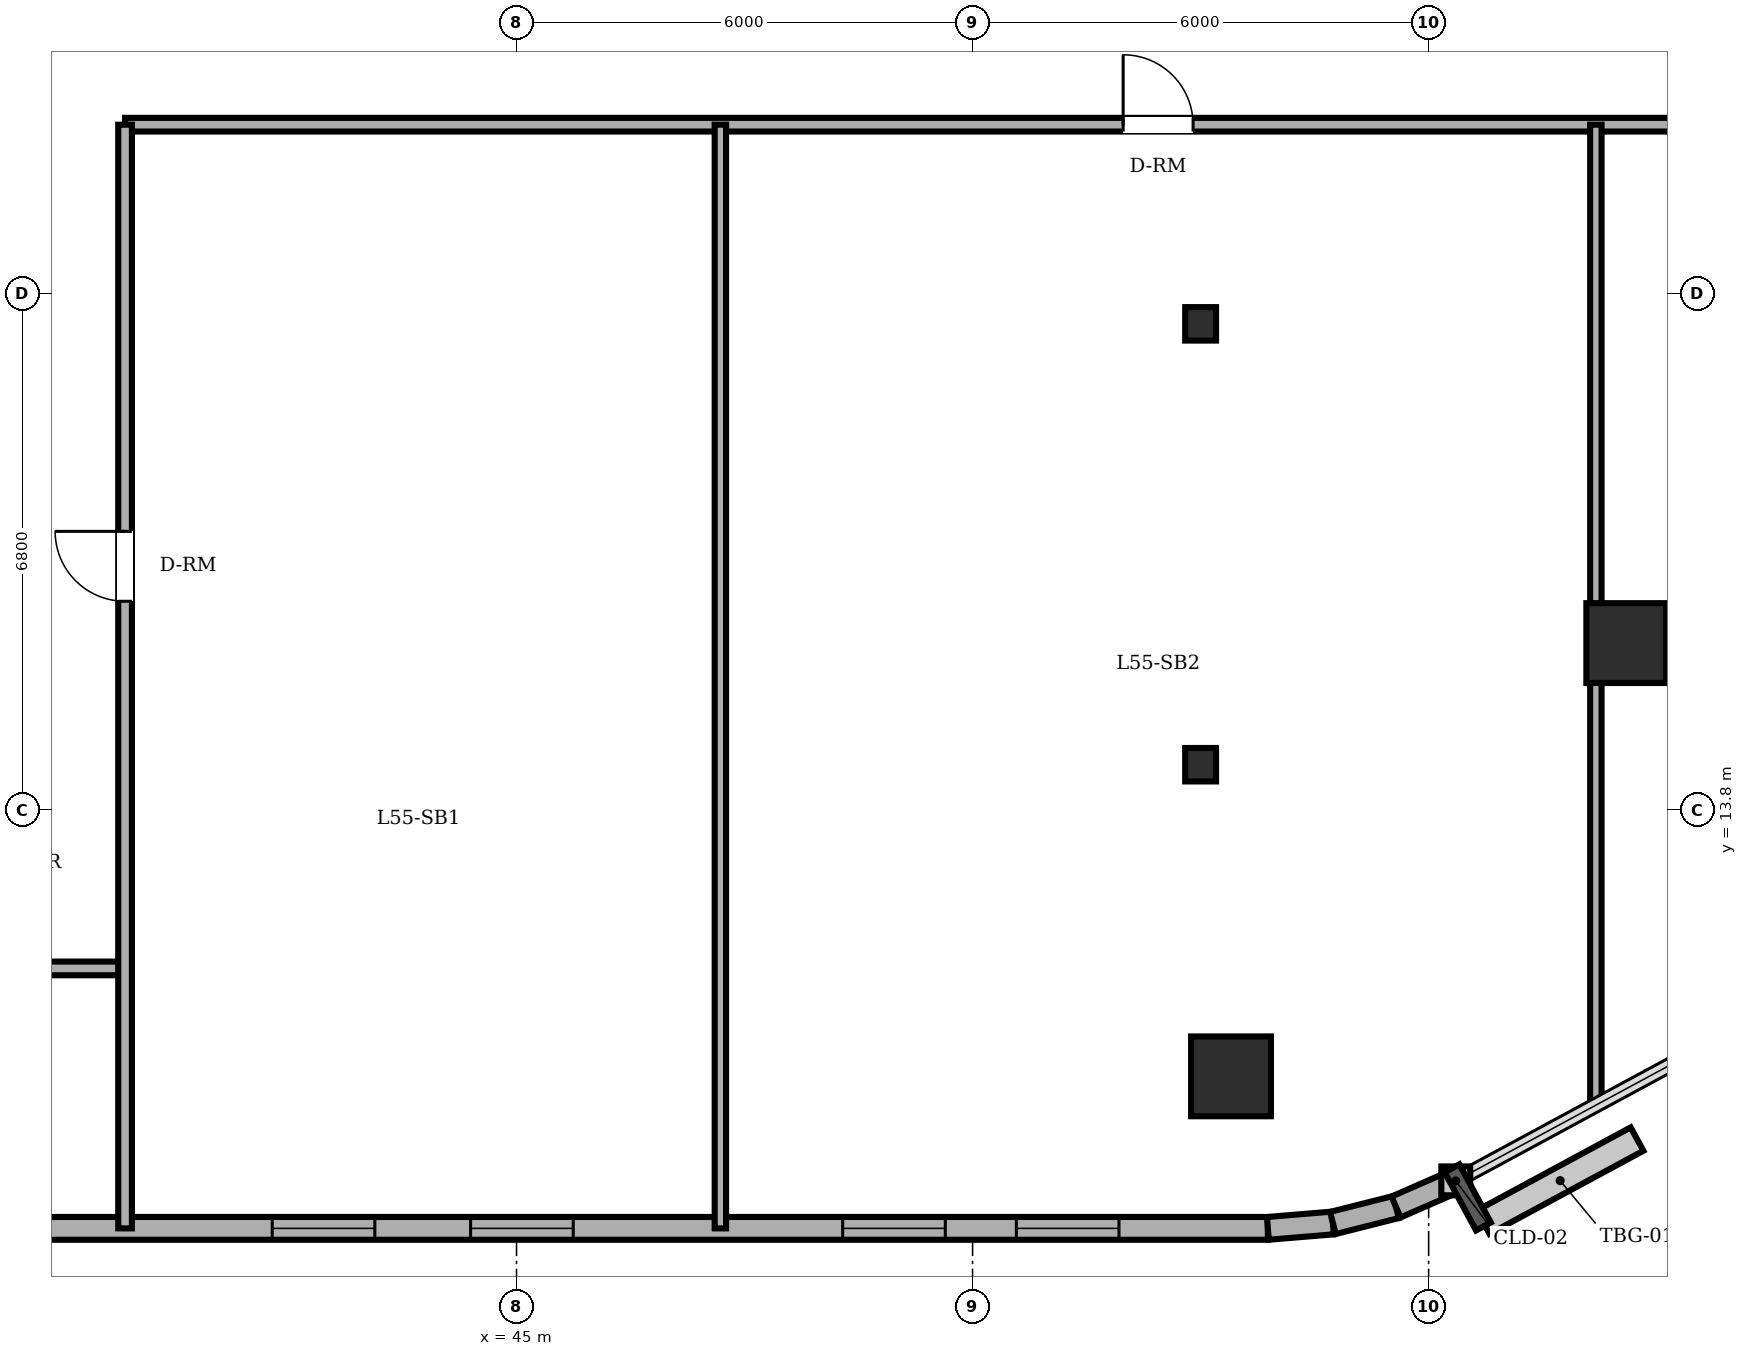
"""IFC4 building model, lengths in metres.
Left out: names, types, materials, properties, quantities, classifications, styles, units other than length and angle.
Written with IfcOpenShell. Run it as: python <this file> out.ifc"""

import sys

from ifc_helpers import new_model, si_unit, direction, frame, frame_2d, origin, origin_2d, place, context, subcontext, project, spatial, rectangle, circle, i_section, extrude, element, fill, save


model = new_model("IFC4")
c1 = context("Model", 3, precision=1e-05, world=origin(), true_north=direction((0.0, 1.0)))
c2 = subcontext(c1, "Body", "Model", "MODEL_VIEW")
j1 = project(units=[si_unit("LENGTHUNIT", "METRE"), si_unit("PLANEANGLEUNIT", "RADIAN")], contexts=[c1])
p1 = place(None, origin())
s1 = spatial("IfcSite", under=j1, at=p1, CompositionType="ELEMENT")
p2 = place(p1, origin())
s2 = spatial("IfcBuilding", under=s1, at=p2, CompositionType="ELEMENT")
p3 = place(p2, frame((0.0, 0.0, 212.1)))
s3 = spatial("IfcBuildingStorey", under=s2, at=p3, CompositionType="ELEMENT", Elevation=212.1)
for number, where, z_axis, x_axis in (
    (1, (54.4, 10.3, 0.0), (0.0, 0.0, 1.0), (1.0, 0.0, 0.0)),
    (2, (59.6, 16.0, 0.0), (0.0, 0.0, 1.0), (1.0, 0.0, 0.0)),
):
    element("IfcColumn", number, at=place(p3, frame(where, z_axis=z_axis, x_axis=x_axis)), inside=s3, PredefinedType="COLUMN", context=c2, shape_type="SweptSolid", body=[
        extrude(circle(Radius=0.525, at=origin_2d()), origin(), (0.0, 0.0, 1.0), 3.6),
    ])
for number, where, z_axis, x_axis in (
    (3, (54.0, 14.4, 0.0), (0.0, 0.0, 1.0), (1.0, 0.0, 0.0)),
    (4, (54.0, 20.2, 0.0), (0.0, 0.0, 1.0), (1.0, 0.0, 0.0)),
):
    element("IfcColumn", number, at=place(p3, frame(where, z_axis=z_axis, x_axis=x_axis)), inside=s3, PredefinedType="COLUMN", context=c2, shape_type="SweptSolid", body=[
        extrude(i_section(OverallWidth=0.406, OverallDepth=0.44, WebThickness=0.024, FlangeThickness=0.039, FilletRadius=0.015, at=origin_2d()), origin(), (0.0, 0.0, 1.0), 3.6),
    ])
p4 = place(p3, frame((22.4, 8.3, 0.0), z_axis=(0.0, 0.0, 1.0), x_axis=(1.0, 0.0, 0.0)))
e5 = element("IfcWall", 5, at=p4, inside=s3, PredefinedType="SOLIDWALL", context=c2, shape_type="SweptSolid", body=[
    extrude(rectangle(XDim=32.485, YDim=0.3, at=frame_2d((16.243, 0.0))), origin(), (0.0, 0.0, 1.0), 3.4),
])
p5 = place(p4, frame((4.525, 0.0, 0.0)))
e6 = element("IfcOpeningElement", 6, at=p5, cuts=e5, PredefinedType="OPENING", context=c2, shape_type="SweptSolid", body=[
    extrude(rectangle(XDim=0.95, YDim=2.2, at=frame_2d((0.475, 1.1))), frame((0.0, 0.16, 0.0), z_axis=(0.0, -1.0, 0.0), x_axis=(1.0, 0.0, 0.0)), (0.0, 0.0, 1.0), 0.32),
])
p6 = place(p4, frame((1.3, 0.0, 0.85)))
e7 = element("IfcOpeningElement", 7, at=p6, cuts=e5, PredefinedType="OPENING", context=c2, shape_type="SweptSolid", body=[
    extrude(rectangle(XDim=1.35, YDim=1.55, at=frame_2d((0.675, 0.775))), frame((0.0, 0.16, 0.0), z_axis=(0.0, -1.0, 0.0), x_axis=(1.0, 0.0, 0.0)), (0.0, 0.0, 1.0), 0.32),
])
p7 = place(p4, frame((10.075, 0.0, 0.85)))
e8 = element("IfcOpeningElement", 8, at=p7, cuts=e5, PredefinedType="OPENING", context=c2, shape_type="SweptSolid", body=[
    extrude(rectangle(XDim=1.35, YDim=1.55, at=frame_2d((0.675, 0.775))), frame((0.0, 0.16, 0.0), z_axis=(0.0, -1.0, 0.0), x_axis=(1.0, 0.0, 0.0)), (0.0, 0.0, 1.0), 0.32),
])
p8 = place(p4, frame((13.425, 0.0, 0.85)))
e9 = element("IfcOpeningElement", 9, at=p8, cuts=e5, PredefinedType="OPENING", context=c2, shape_type="SweptSolid", body=[
    extrude(rectangle(XDim=1.35, YDim=1.55, at=frame_2d((0.675, 0.775))), frame((0.0, 0.16, 0.0), z_axis=(0.0, -1.0, 0.0), x_axis=(1.0, 0.0, 0.0)), (0.0, 0.0, 1.0), 0.32),
])
p9 = place(p4, frame((19.386, 0.0, 0.85)))
e10 = element("IfcOpeningElement", 10, at=p9, cuts=e5, PredefinedType="OPENING", context=c2, shape_type="SweptSolid", body=[
    extrude(rectangle(XDim=1.35, YDim=1.55, at=frame_2d((0.675, 0.775))), frame((0.0, 0.16, 0.0), z_axis=(0.0, -1.0, 0.0), x_axis=(1.0, 0.0, 0.0)), (0.0, 0.0, 1.0), 0.32),
])
p10 = place(p4, frame((21.996, 0.0, 0.85)))
e11 = element("IfcOpeningElement", 11, at=p10, cuts=e5, PredefinedType="OPENING", context=c2, shape_type="SweptSolid", body=[
    extrude(rectangle(XDim=1.35, YDim=1.55, at=frame_2d((0.675, 0.775))), frame((0.0, 0.16, 0.0), z_axis=(0.0, -1.0, 0.0), x_axis=(1.0, 0.0, 0.0)), (0.0, 0.0, 1.0), 0.32),
])
p11 = place(p4, frame((26.891, 0.0, 0.85)))
e12 = element("IfcOpeningElement", 12, at=p11, cuts=e5, PredefinedType="OPENING", context=c2, shape_type="SweptSolid", body=[
    extrude(rectangle(XDim=1.35, YDim=1.55, at=frame_2d((0.675, 0.775))), frame((0.0, 0.16, 0.0), z_axis=(0.0, -1.0, 0.0), x_axis=(1.0, 0.0, 0.0)), (0.0, 0.0, 1.0), 0.32),
])
p12 = place(p4, frame((29.176, 0.0, 0.85)))
e13 = element("IfcOpeningElement", 13, at=p12, cuts=e5, PredefinedType="OPENING", context=c2, shape_type="SweptSolid", body=[
    extrude(rectangle(XDim=1.35, YDim=1.55, at=frame_2d((0.675, 0.775))), frame((0.0, 0.16, 0.0), z_axis=(0.0, -1.0, 0.0), x_axis=(1.0, 0.0, 0.0)), (0.0, 0.0, 1.0), 0.32),
])
p13 = place(p3, frame((54.885, 8.3, 0.0), z_axis=(0.0, 0.0, 1.0), x_axis=(0.996565355958, 0.082809971041, 0.0)))
e14 = element("IfcWall", 14, at=p13, inside=s3, PredefinedType="SOLIDWALL", context=c2, shape_type="SweptSolid", body=[
    extrude(rectangle(XDim=0.858, YDim=0.3, at=frame_2d((0.429, 0.0))), origin(), (0.0, 0.0, 1.0), 3.4),
])
p14 = place(p3, frame((55.74, 8.371, 0.0), z_axis=(0.0, 0.0, 1.0), x_axis=(0.969536346338, 0.244947490555, 0.0)))
e15 = element("IfcWall", 15, at=p14, inside=s3, PredefinedType="SOLIDWALL", context=c2, shape_type="SweptSolid", body=[
    extrude(rectangle(XDim=0.857, YDim=0.3, at=frame_2d((0.429, 0.0))), origin(), (0.0, 0.0, 1.0), 3.4),
])
p15 = place(p3, frame((56.571, 8.581, 0.0), z_axis=(0.0, 0.0, 1.0), x_axis=(0.916085473636, 0.400983048261, 0.0)))
e16 = element("IfcWall", 16, at=p15, inside=s3, PredefinedType="SOLIDWALL", context=c2, shape_type="SweptSolid", body=[
    extrude(rectangle(XDim=0.858, YDim=0.3, at=frame_2d((0.429, 0.0))), origin(), (0.0, 0.0, 1.0), 3.4),
])
p16 = place(p3, frame((17.677, 11.72, 0.0), z_axis=(0.0, 0.0, 1.0), x_axis=(1.0, 0.0, 0.0)))
e17 = element("IfcWall", 17, at=p16, inside=s3, PredefinedType="PARTITIONING", context=c2, shape_type="SweptSolid", body=[
    extrude(rectangle(XDim=22.173, YDim=0.18, at=frame_2d((11.086, 0.0))), origin(), (0.0, 0.0, 1.0), 3.4),
])
p17 = place(p16, frame((9.763, 0.0, 0.0)))
e18 = element("IfcOpeningElement", 18, at=p17, cuts=e17, PredefinedType="OPENING", context=c2, shape_type="SweptSolid", body=[
    extrude(rectangle(XDim=0.92, YDim=2.1, at=frame_2d((0.46, 1.05))), frame((0.0, 0.1, 0.0), z_axis=(0.0, -1.0, 0.0), x_axis=(1.0, 0.0, 0.0)), (0.0, 0.0, 1.0), 0.2),
])
p18 = place(p16, frame((4.063, 0.0, 0.0)))
e19 = element("IfcOpeningElement", 19, at=p18, cuts=e17, PredefinedType="OPENING", context=c2, shape_type="SweptSolid", body=[
    extrude(rectangle(XDim=0.92, YDim=2.1, at=frame_2d((0.46, 1.05))), frame((0.0, 0.1, 0.0), z_axis=(0.0, -1.0, 0.0), x_axis=(1.0, 0.0, 0.0)), (0.0, 0.0, 1.0), 0.2),
])
p19 = place(p16, frame((16.428, 0.0, 0.0)))
e20 = element("IfcOpeningElement", 20, at=p19, cuts=e17, PredefinedType="OPENING", context=c2, shape_type="SweptSolid", body=[
    extrude(rectangle(XDim=0.92, YDim=2.1, at=frame_2d((0.46, 1.05))), frame((0.0, 0.1, 0.0), z_axis=(0.0, -1.0, 0.0), x_axis=(1.0, 0.0, 0.0)), (0.0, 0.0, 1.0), 0.2),
])
p20 = place(p3, frame((39.85, 22.82, 0.0), z_axis=(0.0, 0.0, 1.0), x_axis=(1.0, 0.0, 0.0)))
e21 = element("IfcWall", 21, at=p20, inside=s3, PredefinedType="PARTITIONING", context=c2, shape_type="SweptSolid", body=[
    extrude(rectangle(XDim=28.75, YDim=0.18, at=frame_2d((14.375, 0.0))), origin(), (0.0, 0.0, 1.0), 3.4),
])
p21 = place(p20, frame((13.131, 0.0, 0.0)))
e22 = element("IfcOpeningElement", 22, at=p21, cuts=e21, PredefinedType="OPENING", context=c2, shape_type="SweptSolid", body=[
    extrude(rectangle(XDim=0.92, YDim=2.1, at=frame_2d((0.46, 1.05))), frame((0.0, 0.1, 0.0), z_axis=(0.0, -1.0, 0.0), x_axis=(1.0, 0.0, 0.0)), (0.0, 0.0, 1.0), 0.2),
])
p22 = place(p20, frame((21.19, 0.0, 0.0)))
e23 = element("IfcOpeningElement", 23, at=p22, cuts=e21, PredefinedType="OPENING", context=c2, shape_type="SweptSolid", body=[
    extrude(rectangle(XDim=0.92, YDim=2.1, at=frame_2d((0.46, 1.05))), frame((0.0, 0.1, 0.0), z_axis=(0.0, -1.0, 0.0), x_axis=(1.0, 0.0, 0.0)), (0.0, 0.0, 1.0), 0.2),
])
p23 = place(p3, frame((39.85, 8.3, 0.0), z_axis=(0.0, 0.0, 1.0), x_axis=(0.0, 1.0, 0.0)))
e24 = element("IfcWall", 24, at=p23, inside=s3, PredefinedType="PARTITIONING", context=c2, shape_type="SweptSolid", body=[
    extrude(rectangle(XDim=14.52, YDim=0.18, at=frame_2d((7.26, 0.0))), origin(), (0.0, 0.0, 1.0), 3.4),
])
p24 = place(p23, frame((8.25, 0.0, 0.0)))
e25 = element("IfcOpeningElement", 25, at=p24, cuts=e24, PredefinedType="OPENING", context=c2, shape_type="SweptSolid", body=[
    extrude(rectangle(XDim=0.92, YDim=2.1, at=frame_2d((0.46, 1.05))), frame((0.0, 0.1, 0.0), z_axis=(0.0, -1.0, 0.0), x_axis=(1.0, 0.0, 0.0)), (0.0, 0.0, 1.0), 0.2),
])
p25 = place(p3, frame((47.682, 8.3, 0.0), z_axis=(0.0, 0.0, 1.0), x_axis=(0.0, 1.0, 0.0)))
e26 = element("IfcWall", 26, at=p25, inside=s3, PredefinedType="PARTITIONING", context=c2, shape_type="SweptSolid", body=[
    extrude(rectangle(XDim=14.52, YDim=0.15, at=frame_2d((7.26, 0.0))), origin(), (0.0, 0.0, 1.0), 3.4),
])
p26 = place(p3, frame((59.2, 9.921, 0.0), z_axis=(0.0, 0.0, 1.0), x_axis=(0.0, 1.0, 0.0)))
e27 = element("IfcWall", 27, at=p26, inside=s3, PredefinedType="PARTITIONING", context=c2, shape_type="SweptSolid", body=[
    extrude(rectangle(XDim=12.899, YDim=0.15, at=frame_2d((6.45, 0.0))), origin(), (0.0, 0.0, 1.0), 3.4),
])
p27 = place(p9, origin())
e28 = element("IfcWindow", 28, at=p27, inside=s3, PartitioningType="SINGLE_PANEL", PredefinedType="WINDOW", context=c2, shape_type="SweptSolid", body=[
    extrude(rectangle(XDim=1.35, YDim=1.55, at=frame_2d((0.675, 0.775))), frame((0.0, 0.03, 0.0), z_axis=(0.0, -1.0, 0.0), x_axis=(1.0, 0.0, 0.0)), (0.0, 0.0, 1.0), 0.06),
])
fill(e10, e28)
p28 = place(p10, origin())
e29 = element("IfcWindow", 29, at=p28, inside=s3, PartitioningType="SINGLE_PANEL", PredefinedType="WINDOW", context=c2, shape_type="SweptSolid", body=[
    extrude(rectangle(XDim=1.35, YDim=1.55, at=frame_2d((0.675, 0.775))), frame((0.0, 0.03, 0.0), z_axis=(0.0, -1.0, 0.0), x_axis=(1.0, 0.0, 0.0)), (0.0, 0.0, 1.0), 0.06),
])
fill(e11, e29)
p29 = place(p11, origin())
e30 = element("IfcWindow", 30, at=p29, inside=s3, PartitioningType="SINGLE_PANEL", PredefinedType="WINDOW", context=c2, shape_type="SweptSolid", body=[
    extrude(rectangle(XDim=1.35, YDim=1.55, at=frame_2d((0.675, 0.775))), frame((0.0, 0.03, 0.0), z_axis=(0.0, -1.0, 0.0), x_axis=(1.0, 0.0, 0.0)), (0.0, 0.0, 1.0), 0.06),
])
fill(e12, e30)
p30 = place(p12, origin())
e31 = element("IfcWindow", 31, at=p30, inside=s3, PartitioningType="SINGLE_PANEL", PredefinedType="WINDOW", context=c2, shape_type="SweptSolid", body=[
    extrude(rectangle(XDim=1.35, YDim=1.55, at=frame_2d((0.675, 0.775))), frame((0.0, 0.03, 0.0), z_axis=(0.0, -1.0, 0.0), x_axis=(1.0, 0.0, 0.0)), (0.0, 0.0, 1.0), 0.06),
])
fill(e13, e31)
p31 = place(p24, origin())
e32 = element("IfcDoor", 32, at=p31, inside=s3, OperationType="SINGLE_SWING_RIGHT", PredefinedType="DOOR", context=c2, shape_type="SweptSolid", body=[
    extrude(rectangle(XDim=0.92, YDim=2.1, at=frame_2d((0.46, 1.05))), frame((0.0, 0.025, 0.0), z_axis=(0.0, -1.0, 0.0), x_axis=(1.0, 0.0, 0.0)), (0.0, 0.0, 1.0), 0.05),
])
fill(e25, e32)
p32 = place(p21, origin())
e33 = element("IfcDoor", 33, at=p32, inside=s3, OperationType="SINGLE_SWING_LEFT", PredefinedType="DOOR", context=c2, shape_type="SweptSolid", body=[
    extrude(rectangle(XDim=0.92, YDim=2.1, at=frame_2d((0.46, 1.05))), frame((0.0, 0.025, 0.0), z_axis=(0.0, -1.0, 0.0), x_axis=(1.0, 0.0, 0.0)), (0.0, 0.0, 1.0), 0.05),
])
fill(e22, e33)
save(model, sys.argv[1])
